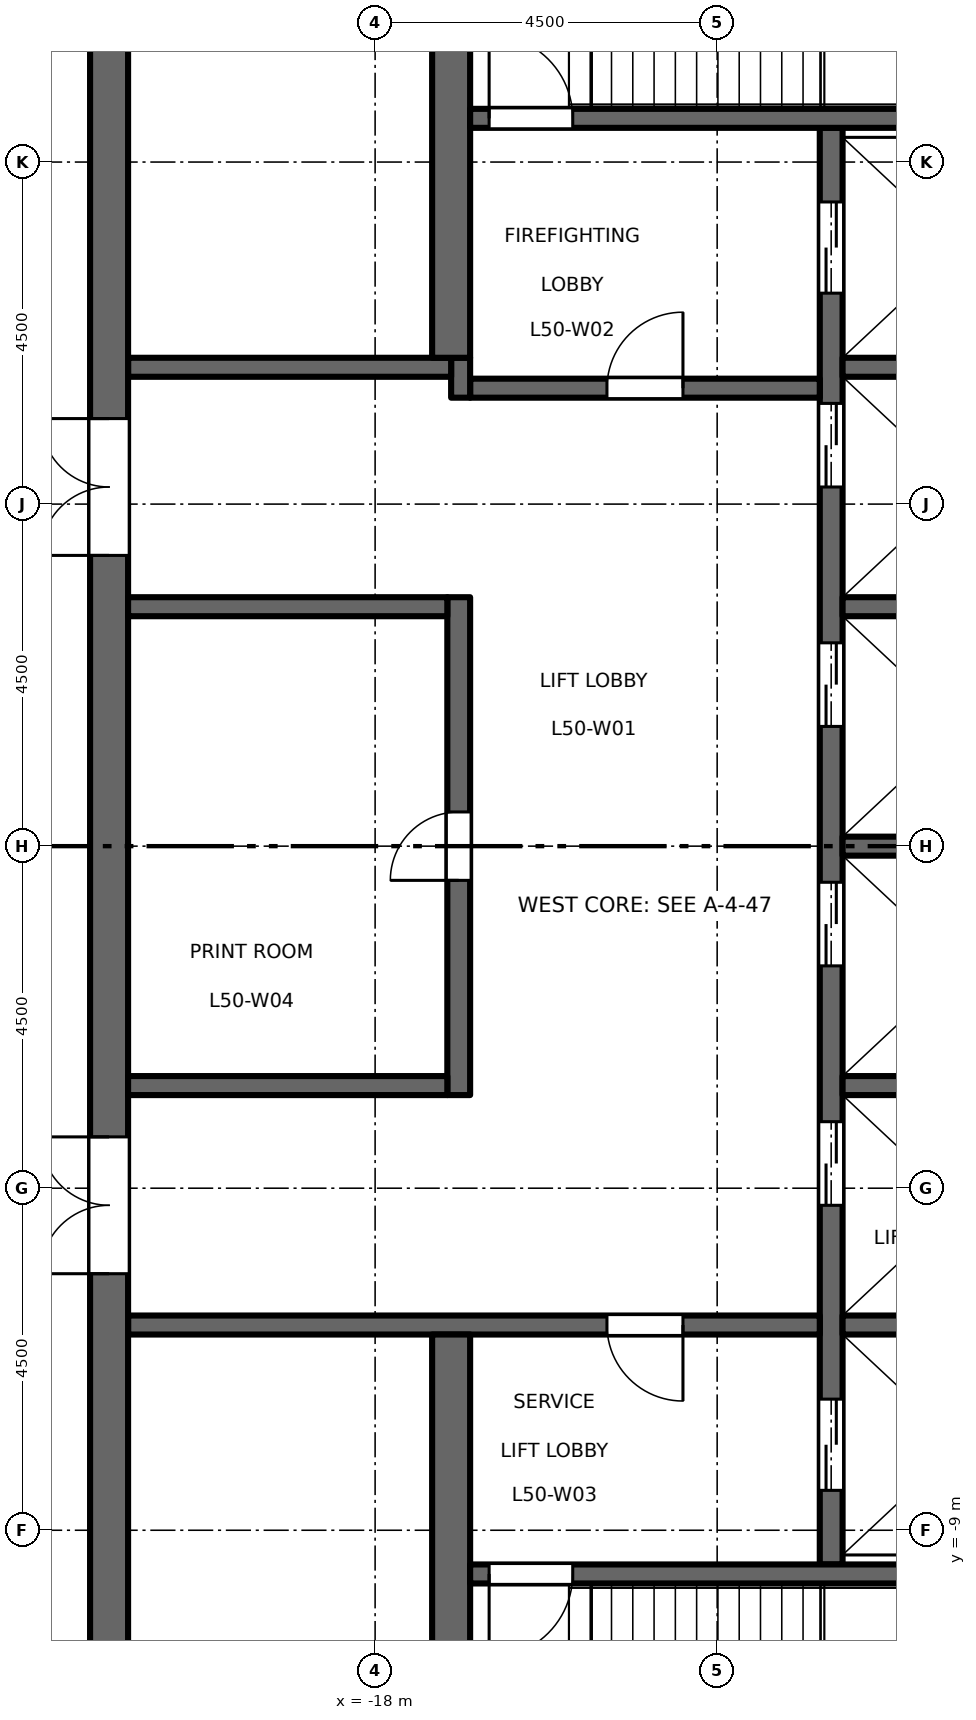
"""IFC4 building model, lengths in metres.
Left out: names, types, materials, properties, quantities, classifications, styles, units other than length and angle.
Written with IfcOpenShell. Run it as: python <this file> out.ifc"""

import sys

from ifc_helpers import new_model, si_unit, direction, frame, frame_2d, origin, place, context, subcontext, project, spatial, rectangle, extrude, element, fill, save


model = new_model("IFC4")
c1 = context("Model", 3, precision=1e-05, world=origin(), true_north=direction((0.0, 1.0)))
c2 = subcontext(c1, "Body", "Model", "MODEL_VIEW")
j1 = project(units=[si_unit("LENGTHUNIT", "METRE"), si_unit("PLANEANGLEUNIT", "RADIAN")], contexts=[c1])
p1 = place(None, origin())
s1 = spatial("IfcSite", under=j1, at=p1, CompositionType="ELEMENT")
p2 = place(p1, origin())
s2 = spatial("IfcBuilding", under=s1, at=p2, CompositionType="ELEMENT")
p3 = place(p2, frame((0.0, 0.0, 233.2)))
s3 = spatial("IfcBuildingStorey", under=s2, at=p3, CompositionType="ELEMENT", Elevation=233.2)
p4 = place(p3, frame((-12.0, -9.45, 0.0), z_axis=(0.0, 0.0, 1.0), x_axis=(0.0, 1.0, 0.0)))
e1 = element("IfcWall", 1, at=p4, inside=s3, PredefinedType="SHEAR", context=c2, shape_type="SweptSolid", body=[
    extrude(rectangle(XDim=18.9, YDim=0.3, at=frame_2d((9.45, 0.0))), origin(), (0.0, 0.0, 1.0), 4.35),
])
p5 = place(p4, frame((4.725, 0.0, 0.0)))
e2 = element("IfcOpeningElement", 2, at=p5, cuts=e1, PredefinedType="OPENING", context=c2, shape_type="SweptSolid", body=[
    extrude(rectangle(XDim=1.1, YDim=2.1, at=frame_2d((0.55, 1.05))), frame((0.0, 0.16, 0.0), z_axis=(0.0, -1.0, 0.0), x_axis=(1.0, 0.0, 0.0)), (0.0, 0.0, 1.0), 0.32),
])
p6 = place(p4, frame((7.875, 0.0, 0.0)))
e3 = element("IfcOpeningElement", 3, at=p6, cuts=e1, PredefinedType="OPENING", context=c2, shape_type="SweptSolid", body=[
    extrude(rectangle(XDim=1.1, YDim=2.1, at=frame_2d((0.55, 1.05))), frame((0.0, 0.16, 0.0), z_axis=(0.0, -1.0, 0.0), x_axis=(1.0, 0.0, 0.0)), (0.0, 0.0, 1.0), 0.32),
])
p7 = place(p4, frame((11.025, 0.0, 0.0)))
e4 = element("IfcOpeningElement", 4, at=p7, cuts=e1, PredefinedType="OPENING", context=c2, shape_type="SweptSolid", body=[
    extrude(rectangle(XDim=1.1, YDim=2.1, at=frame_2d((0.55, 1.05))), frame((0.0, 0.16, 0.0), z_axis=(0.0, -1.0, 0.0), x_axis=(1.0, 0.0, 0.0)), (0.0, 0.0, 1.0), 0.32),
])
p8 = place(p4, frame((14.175, 0.0, 0.0)))
e5 = element("IfcOpeningElement", 5, at=p8, cuts=e1, PredefinedType="OPENING", context=c2, shape_type="SweptSolid", body=[
    extrude(rectangle(XDim=1.1, YDim=2.1, at=frame_2d((0.55, 1.05))), frame((0.0, 0.16, 0.0), z_axis=(0.0, -1.0, 0.0), x_axis=(1.0, 0.0, 0.0)), (0.0, 0.0, 1.0), 0.32),
])
p9 = place(p4, frame((16.725, 0.0, 0.0)))
e6 = element("IfcOpeningElement", 6, at=p9, cuts=e1, PredefinedType="OPENING", context=c2, shape_type="SweptSolid", body=[
    extrude(rectangle(XDim=1.2, YDim=2.1, at=frame_2d((0.6, 1.05))), frame((0.0, 0.16, 0.0), z_axis=(0.0, -1.0, 0.0), x_axis=(1.0, 0.0, 0.0)), (0.0, 0.0, 1.0), 0.32),
])
p10 = place(p4, frame((0.975, 0.0, 0.0)))
e7 = element("IfcOpeningElement", 7, at=p10, cuts=e1, PredefinedType="OPENING", context=c2, shape_type="SweptSolid", body=[
    extrude(rectangle(XDim=1.2, YDim=2.1, at=frame_2d((0.6, 1.05))), frame((0.0, 0.16, 0.0), z_axis=(0.0, -1.0, 0.0), x_axis=(1.0, 0.0, 0.0)), (0.0, 0.0, 1.0), 0.32),
])
p11 = place(p3, frame((-12.15, 6.025, 0.0), z_axis=(0.0, 0.0, 1.0), x_axis=(-1.0, 0.0, 0.0)))
e8 = element("IfcWall", 8, at=p11, inside=s3, PredefinedType="SHEAR", context=c2, shape_type="SweptSolid", body=[
    extrude(rectangle(XDim=4.6, YDim=0.25, at=frame_2d((2.3, 0.0))), origin(), (0.0, 0.0, 1.0), 4.35),
])
p12 = place(p11, frame((1.8, 0.0, 0.0)))
e9 = element("IfcOpeningElement", 9, at=p12, cuts=e8, PredefinedType="OPENING", context=c2, shape_type="SweptSolid", body=[
    extrude(rectangle(XDim=1.0, YDim=2.1, at=frame_2d((0.5, 1.05))), frame((0.0, 0.135, 0.0), z_axis=(0.0, -1.0, 0.0), x_axis=(1.0, 0.0, 0.0)), (0.0, 0.0, 1.0), 0.27),
])
p13 = place(p3, frame((-16.875, 5.9, 0.0), z_axis=(0.0, 0.0, 1.0), x_axis=(0.0, 1.0, 0.0)))
e10 = element("IfcWall", 10, at=p13, inside=s3, PredefinedType="SHEAR", context=c2, shape_type="SweptSolid", body=[
    extrude(rectangle(XDim=0.525, YDim=0.25, at=frame_2d((0.263, 0.0))), origin(), (0.0, 0.0, 1.0), 4.35),
])
p14 = place(p3, frame((-17.0, 6.3, 0.0), z_axis=(0.0, 0.0, 1.0), x_axis=(-1.0, 0.0, 0.0)))
e11 = element("IfcWall", 11, at=p14, inside=s3, PredefinedType="SHEAR", context=c2, shape_type="SweptSolid", body=[
    extrude(rectangle(XDim=4.25, YDim=0.25, at=frame_2d((2.125, 0.0))), origin(), (0.0, 0.0, 1.0), 4.35),
])
p15 = place(p3, frame((-12.15, -6.3, 0.0), z_axis=(0.0, 0.0, 1.0), x_axis=(-1.0, 0.0, 0.0)))
e12 = element("IfcWall", 12, at=p15, inside=s3, PredefinedType="SHEAR", context=c2, shape_type="SweptSolid", body=[
    extrude(rectangle(XDim=9.1, YDim=0.25, at=frame_2d((4.55, 0.0))), origin(), (0.0, 0.0, 1.0), 4.35),
])
p16 = place(p15, frame((1.8, 0.0, 0.0)))
e13 = element("IfcOpeningElement", 13, at=p16, cuts=e12, PredefinedType="OPENING", context=c2, shape_type="SweptSolid", body=[
    extrude(rectangle(XDim=1.0, YDim=2.1, at=frame_2d((0.5, 1.05))), frame((0.0, 0.135, 0.0), z_axis=(0.0, -1.0, 0.0), x_axis=(1.0, 0.0, 0.0)), (0.0, 0.0, 1.0), 0.27),
])
p17 = place(p3, frame((-21.5, -13.0, 0.0), z_axis=(0.0, 0.0, 1.0), x_axis=(0.0, 1.0, 0.0)))
e14 = element("IfcWall", 14, at=p17, inside=s3, PredefinedType="SHEAR", context=c2, shape_type="SweptSolid", body=[
    extrude(rectangle(XDim=26.0, YDim=0.5, at=frame_2d((13.0, 0.0))), origin(), (0.0, 0.0, 1.0), 4.35),
])
p18 = place(p17, frame((16.825, 0.0, 0.0)))
e15 = element("IfcOpeningElement", 15, at=p18, cuts=e14, PredefinedType="OPENING", context=c2, shape_type="SweptSolid", body=[
    extrude(rectangle(XDim=1.8, YDim=2.1, at=frame_2d((0.9, 1.05))), frame((0.0, 0.26, 0.0), z_axis=(0.0, -1.0, 0.0), x_axis=(1.0, 0.0, 0.0)), (0.0, 0.0, 1.0), 0.52),
])
p19 = place(p17, frame((7.375, 0.0, 0.0)))
e16 = element("IfcOpeningElement", 16, at=p19, cuts=e14, PredefinedType="OPENING", context=c2, shape_type="SweptSolid", body=[
    extrude(rectangle(XDim=1.8, YDim=2.1, at=frame_2d((0.9, 1.05))), frame((0.0, 0.26, 0.0), z_axis=(0.0, -1.0, 0.0), x_axis=(1.0, 0.0, 0.0)), (0.0, 0.0, 1.0), 0.52),
])
p20 = place(p3, frame((-16.9, -3.275, 0.0), z_axis=(0.0, 0.0, 1.0), x_axis=(0.0, 1.0, 0.0)))
e17 = element("IfcWall", 17, at=p20, inside=s3, PredefinedType="SHEAR", context=c2, shape_type="SweptSolid", body=[
    extrude(rectangle(XDim=6.55, YDim=0.3, at=frame_2d((3.275, 0.0))), origin(), (0.0, 0.0, 1.0), 4.35),
])
p21 = place(p20, frame((2.825, 0.0, 0.0)))
e18 = element("IfcOpeningElement", 18, at=p21, cuts=e17, PredefinedType="OPENING", context=c2, shape_type="SweptSolid", body=[
    extrude(rectangle(XDim=0.9, YDim=2.1, at=frame_2d((0.45, 1.05))), frame((0.0, 0.16, 0.0), z_axis=(0.0, -1.0, 0.0), x_axis=(1.0, 0.0, 0.0)), (0.0, 0.0, 1.0), 0.32),
])
for number, where, z_axis, x_axis in (
    (19, (-17.05, 3.15, 0.0), (0.0, 0.0, 1.0), (-1.0, 0.0, 0.0)),
    (20, (-17.05, -3.15, 0.0), (0.0, 0.0, 1.0), (-1.0, 0.0, 0.0)),
):
    element("IfcWall", number, at=place(p3, frame(where, z_axis=z_axis, x_axis=x_axis)), inside=s3, PredefinedType="SHEAR", context=c2, shape_type="SweptSolid", body=[
        extrude(rectangle(XDim=4.2, YDim=0.25, at=frame_2d((2.1, 0.0))), origin(), (0.0, 0.0, 1.0), 4.35),
    ])
for number, where, z_axis, x_axis in (
    (21, (-17.0, 6.425, 0.0), (0.0, 0.0, 1.0), (0.0, 1.0, 0.0)),
    (22, (-17.0, -13.0, 0.0), (0.0, 0.0, 1.0), (0.0, 1.0, 0.0)),
):
    element("IfcWall", number, at=place(p3, frame(where, z_axis=z_axis, x_axis=x_axis)), inside=s3, PredefinedType="SHEAR", context=c2, shape_type="SweptSolid", body=[
        extrude(rectangle(XDim=6.575, YDim=0.5, at=frame_2d((3.288, 0.0))), origin(), (0.0, 0.0, 1.0), 4.35),
    ])
for number, where, z_axis, x_axis in (
    (23, (-8.75, 0.0, 0.0), (0.0, 0.0, 1.0), (-1.0, 0.0, 0.0)),
    (24, (-8.75, 3.15, 0.0), (0.0, 0.0, 1.0), (-1.0, 0.0, 0.0)),
    (25, (-8.75, 6.3, 0.0), (0.0, 0.0, 1.0), (-1.0, 0.0, 0.0)),
    (26, (-8.75, -3.15, 0.0), (0.0, 0.0, 1.0), (-1.0, 0.0, 0.0)),
    (27, (-8.75, -6.3, 0.0), (0.0, 0.0, 1.0), (-1.0, 0.0, 0.0)),
):
    element("IfcWall", number, at=place(p3, frame(where, z_axis=z_axis, x_axis=x_axis)), inside=s3, PredefinedType="SHEAR", context=c2, shape_type="SweptSolid", body=[
        extrude(rectangle(XDim=3.1, YDim=0.25, at=frame_2d((1.55, 0.0))), origin(), (0.0, 0.0, 1.0), 4.35),
    ])
p22 = place(p3, frame((-8.75, 9.575, 0.0), z_axis=(0.0, 0.0, 1.0), x_axis=(-1.0, 0.0, 0.0)))
e28 = element("IfcWall", 28, at=p22, inside=s3, PredefinedType="SHEAR", context=c2, shape_type="SweptSolid", body=[
    extrude(rectangle(XDim=8.0, YDim=0.25, at=frame_2d((4.0, 0.0))), origin(), (0.0, 0.0, 1.0), 4.35),
])
p23 = place(p22, frame((6.65, 0.0, 0.0)))
e29 = element("IfcOpeningElement", 29, at=p23, cuts=e28, PredefinedType="OPENING", context=c2, shape_type="SweptSolid", body=[
    extrude(rectangle(XDim=1.1, YDim=2.1, at=frame_2d((0.55, 1.05))), frame((0.0, 0.135, 0.0), z_axis=(0.0, -1.0, 0.0), x_axis=(1.0, 0.0, 0.0)), (0.0, 0.0, 1.0), 0.27),
])
p24 = place(p3, frame((-8.75, -9.575, 0.0), z_axis=(0.0, 0.0, 1.0), x_axis=(-1.0, 0.0, 0.0)))
e30 = element("IfcWall", 30, at=p24, inside=s3, PredefinedType="SHEAR", context=c2, shape_type="SweptSolid", body=[
    extrude(rectangle(XDim=8.0, YDim=0.25, at=frame_2d((4.0, 0.0))), origin(), (0.0, 0.0, 1.0), 4.35),
])
p25 = place(p24, frame((6.65, 0.0, 0.0)))
e31 = element("IfcOpeningElement", 31, at=p25, cuts=e30, PredefinedType="OPENING", context=c2, shape_type="SweptSolid", body=[
    extrude(rectangle(XDim=1.1, YDim=2.1, at=frame_2d((0.55, 1.05))), frame((0.0, 0.135, 0.0), z_axis=(0.0, -1.0, 0.0), x_axis=(1.0, 0.0, 0.0)), (0.0, 0.0, 1.0), 0.27),
])
p26 = place(p12, origin())
e32 = element("IfcDoor", 32, at=p26, inside=s3, OperationType="SINGLE_SWING_LEFT", PredefinedType="DOOR", context=c2, shape_type="SweptSolid", body=[
    extrude(rectangle(XDim=1.0, YDim=2.1, at=frame_2d((0.5, 1.05))), frame((0.0, 0.025, 0.0), z_axis=(0.0, -1.0, 0.0), x_axis=(1.0, 0.0, 0.0)), (0.0, 0.0, 1.0), 0.05),
])
fill(e9, e32)
p27 = place(p16, origin())
e33 = element("IfcDoor", 33, at=p27, inside=s3, OperationType="SINGLE_SWING_RIGHT", PredefinedType="DOOR", context=c2, shape_type="SweptSolid", body=[
    extrude(rectangle(XDim=1.0, YDim=2.1, at=frame_2d((0.5, 1.05))), frame((0.0, 0.025, 0.0), z_axis=(0.0, -1.0, 0.0), x_axis=(1.0, 0.0, 0.0)), (0.0, 0.0, 1.0), 0.05),
])
fill(e13, e33)
p28 = place(p23, origin())
e34 = element("IfcDoor", 34, at=p28, inside=s3, OperationType="SINGLE_SWING_RIGHT", PredefinedType="DOOR", context=c2, shape_type="SweptSolid", body=[
    extrude(rectangle(XDim=1.1, YDim=2.1, at=frame_2d((0.55, 1.05))), frame((0.0, 0.025, 0.0), z_axis=(0.0, -1.0, 0.0), x_axis=(1.0, 0.0, 0.0)), (0.0, 0.0, 1.0), 0.05),
])
fill(e29, e34)
p29 = place(p25, origin())
e35 = element("IfcDoor", 35, at=p29, inside=s3, OperationType="SINGLE_SWING_LEFT", PredefinedType="DOOR", context=c2, shape_type="SweptSolid", body=[
    extrude(rectangle(XDim=1.1, YDim=2.1, at=frame_2d((0.55, 1.05))), frame((0.0, 0.025, 0.0), z_axis=(0.0, -1.0, 0.0), x_axis=(1.0, 0.0, 0.0)), (0.0, 0.0, 1.0), 0.05),
])
fill(e31, e35)
p30 = place(p18, origin())
e36 = element("IfcDoor", 36, at=p30, inside=s3, OperationType="DOUBLE_DOOR_DOUBLE_SWING", PredefinedType="DOOR", context=c2, shape_type="SweptSolid", body=[
    extrude(rectangle(XDim=1.8, YDim=2.1, at=frame_2d((0.9, 1.05))), frame((0.0, 0.025, 0.0), z_axis=(0.0, -1.0, 0.0), x_axis=(1.0, 0.0, 0.0)), (0.0, 0.0, 1.0), 0.05),
])
fill(e15, e36)
p31 = place(p19, origin())
e37 = element("IfcDoor", 37, at=p31, inside=s3, OperationType="DOUBLE_DOOR_DOUBLE_SWING", PredefinedType="DOOR", context=c2, shape_type="SweptSolid", body=[
    extrude(rectangle(XDim=1.8, YDim=2.1, at=frame_2d((0.9, 1.05))), frame((0.0, 0.025, 0.0), z_axis=(0.0, -1.0, 0.0), x_axis=(1.0, 0.0, 0.0)), (0.0, 0.0, 1.0), 0.05),
])
fill(e16, e37)
p32 = place(p5, origin())
e38 = element("IfcDoor", 38, at=p32, inside=s3, OperationType="DOUBLE_DOOR_SLIDING", PredefinedType="DOOR", context=c2, shape_type="SweptSolid", body=[
    extrude(rectangle(XDim=1.1, YDim=2.1, at=frame_2d((0.55, 1.05))), frame((0.0, 0.025, 0.0), z_axis=(0.0, -1.0, 0.0), x_axis=(1.0, 0.0, 0.0)), (0.0, 0.0, 1.0), 0.05),
])
fill(e2, e38)
p33 = place(p6, origin())
e39 = element("IfcDoor", 39, at=p33, inside=s3, OperationType="DOUBLE_DOOR_SLIDING", PredefinedType="DOOR", context=c2, shape_type="SweptSolid", body=[
    extrude(rectangle(XDim=1.1, YDim=2.1, at=frame_2d((0.55, 1.05))), frame((0.0, 0.025, 0.0), z_axis=(0.0, -1.0, 0.0), x_axis=(1.0, 0.0, 0.0)), (0.0, 0.0, 1.0), 0.05),
])
fill(e3, e39)
p34 = place(p7, origin())
e40 = element("IfcDoor", 40, at=p34, inside=s3, OperationType="DOUBLE_DOOR_SLIDING", PredefinedType="DOOR", context=c2, shape_type="SweptSolid", body=[
    extrude(rectangle(XDim=1.1, YDim=2.1, at=frame_2d((0.55, 1.05))), frame((0.0, 0.025, 0.0), z_axis=(0.0, -1.0, 0.0), x_axis=(1.0, 0.0, 0.0)), (0.0, 0.0, 1.0), 0.05),
])
fill(e4, e40)
p35 = place(p8, origin())
e41 = element("IfcDoor", 41, at=p35, inside=s3, OperationType="DOUBLE_DOOR_SLIDING", PredefinedType="DOOR", context=c2, shape_type="SweptSolid", body=[
    extrude(rectangle(XDim=1.1, YDim=2.1, at=frame_2d((0.55, 1.05))), frame((0.0, 0.025, 0.0), z_axis=(0.0, -1.0, 0.0), x_axis=(1.0, 0.0, 0.0)), (0.0, 0.0, 1.0), 0.05),
])
fill(e5, e41)
p36 = place(p9, origin())
e42 = element("IfcDoor", 42, at=p36, inside=s3, OperationType="DOUBLE_DOOR_SLIDING", PredefinedType="DOOR", context=c2, shape_type="SweptSolid", body=[
    extrude(rectangle(XDim=1.2, YDim=2.1, at=frame_2d((0.6, 1.05))), frame((0.0, 0.025, 0.0), z_axis=(0.0, -1.0, 0.0), x_axis=(1.0, 0.0, 0.0)), (0.0, 0.0, 1.0), 0.05),
])
fill(e6, e42)
p37 = place(p10, origin())
e43 = element("IfcDoor", 43, at=p37, inside=s3, OperationType="DOUBLE_DOOR_SLIDING", PredefinedType="DOOR", context=c2, shape_type="SweptSolid", body=[
    extrude(rectangle(XDim=1.2, YDim=2.1, at=frame_2d((0.6, 1.05))), frame((0.0, 0.025, 0.0), z_axis=(0.0, -1.0, 0.0), x_axis=(1.0, 0.0, 0.0)), (0.0, 0.0, 1.0), 0.05),
])
fill(e7, e43)
p38 = place(p21, origin())
e44 = element("IfcDoor", 44, at=p38, inside=s3, OperationType="SINGLE_SWING_RIGHT", PredefinedType="DOOR", context=c2, shape_type="SweptSolid", body=[
    extrude(rectangle(XDim=0.9, YDim=2.1, at=frame_2d((0.45, 1.05))), frame((0.0, 0.025, 0.0), z_axis=(0.0, -1.0, 0.0), x_axis=(1.0, 0.0, 0.0)), (0.0, 0.0, 1.0), 0.05),
])
fill(e18, e44)
save(model, sys.argv[1])
